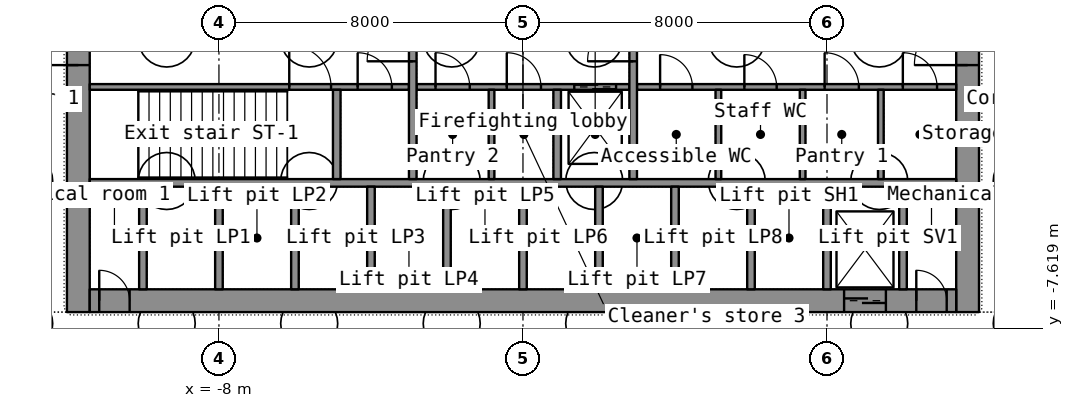
"""IFC4 building model, lengths in metres.
Left out: names, types, materials, properties, quantities, classifications, styles, units other than length and angle.
Written with IfcOpenShell. Run it as: python <this file> out.ifc"""

import sys

from ifc_helpers import new_model, si_unit, direction, frame, frame_2d, origin, place, context, subcontext, project, spatial, rectangle, extrude, element, fill, save


model = new_model("IFC4")
c1 = context("Model", 3, precision=1e-05, world=origin(), true_north=direction((0.0, 1.0)))
c2 = subcontext(c1, "Body", "Model", "MODEL_VIEW")
j1 = project(units=[si_unit("LENGTHUNIT", "METRE"), si_unit("PLANEANGLEUNIT", "RADIAN")], contexts=[c1])
p1 = place(None, origin())
s1 = spatial("IfcSite", under=j1, at=p1, CompositionType="ELEMENT")
p2 = place(p1, origin())
s2 = spatial("IfcBuilding", under=s1, at=p2, CompositionType="ELEMENT")
p3 = place(p2, frame((0.0, 0.0, -5.0)))
s3 = spatial("IfcBuildingStorey", under=s2, at=p3, CompositionType="ELEMENT", Elevation=-5.0)
p4 = place(p3, frame((-11.7, -7.2, 0.0), z_axis=(0.0, 0.0, 1.0), x_axis=(0.0, 1.0, 0.0)))
e1 = element("IfcWall", 1, at=p4, inside=s3, PredefinedType="SHEAR", context=c2, shape_type="SweptSolid", body=[
    extrude(rectangle(XDim=14.4, YDim=0.6, at=frame_2d((7.2, 0.0))), origin(), (0.0, 0.0, 1.0), 4.6),
])
p5 = place(p4, frame((6.5, 0.0, 0.0)))
e2 = element("IfcOpeningElement", 2, at=p5, cuts=e1, PredefinedType="OPENING", context=c2, shape_type="SweptSolid", body=[
    extrude(rectangle(XDim=1.4, YDim=2.2, at=frame_2d((0.7, 1.1))), frame((0.0, 0.31, 0.0), z_axis=(0.0, -1.0, 0.0), x_axis=(1.0, 0.0, 0.0)), (0.0, 0.0, 1.0), 0.62),
])
p6 = place(p3, frame((11.7, -7.2, 0.0), z_axis=(0.0, 0.0, 1.0), x_axis=(0.0, 1.0, 0.0)))
e3 = element("IfcWall", 3, at=p6, inside=s3, PredefinedType="SHEAR", context=c2, shape_type="SweptSolid", body=[
    extrude(rectangle(XDim=14.4, YDim=0.6, at=frame_2d((7.2, 0.0))), origin(), (0.0, 0.0, 1.0), 4.6),
])
p7 = place(p6, frame((6.5, 0.0, 0.0)))
e4 = element("IfcOpeningElement", 4, at=p7, cuts=e3, PredefinedType="OPENING", context=c2, shape_type="SweptSolid", body=[
    extrude(rectangle(XDim=1.4, YDim=2.2, at=frame_2d((0.7, 1.1))), frame((0.0, 0.31, 0.0), z_axis=(0.0, -1.0, 0.0), x_axis=(1.0, 0.0, 0.0)), (0.0, 0.0, 1.0), 0.62),
])
p8 = place(p3, frame((-11.4, -6.9, 0.0), z_axis=(0.0, 0.0, 1.0), x_axis=(1.0, 0.0, 0.0)))
e5 = element("IfcWall", 5, at=p8, inside=s3, PredefinedType="SHEAR", context=c2, shape_type="SweptSolid", body=[
    extrude(rectangle(XDim=22.8, YDim=0.6, at=frame_2d((11.4, 0.0))), origin(), (0.0, 0.0, 1.0), 4.6),
])
p9 = place(p8, frame((19.85, 0.0, 0.0)))
e6 = element("IfcOpeningElement", 6, at=p9, cuts=e5, PredefinedType="OPENING", context=c2, shape_type="SweptSolid", body=[
    extrude(rectangle(XDim=1.1, YDim=2.2, at=frame_2d((0.55, 1.1))), frame((0.0, 0.31, 0.0), z_axis=(0.0, -1.0, 0.0), x_axis=(1.0, 0.0, 0.0)), (0.0, 0.0, 1.0), 0.62),
])
p10 = place(p8, frame((0.25, 0.0, 0.0)))
e7 = element("IfcOpeningElement", 7, at=p10, cuts=e5, PredefinedType="OPENING", context=c2, shape_type="SweptSolid", body=[
    extrude(rectangle(XDim=0.8, YDim=2.05, at=frame_2d((0.4, 1.025))), frame((0.0, 0.31, 0.0), z_axis=(0.0, -1.0, 0.0), x_axis=(1.0, 0.0, 0.0)), (0.0, 0.0, 1.0), 0.62),
])
p11 = place(p8, frame((21.75, 0.0, 0.0)))
e8 = element("IfcOpeningElement", 8, at=p11, cuts=e5, PredefinedType="OPENING", context=c2, shape_type="SweptSolid", body=[
    extrude(rectangle(XDim=0.8, YDim=2.05, at=frame_2d((0.4, 1.025))), frame((0.0, 0.31, 0.0), z_axis=(0.0, -1.0, 0.0), x_axis=(1.0, 0.0, 0.0)), (0.0, 0.0, 1.0), 0.62),
])
p12 = place(p3, frame((-11.4, -3.8, 0.0), z_axis=(0.0, 0.0, 1.0), x_axis=(1.0, 0.0, 0.0)))
e9 = element("IfcWall", 9, at=p12, inside=s3, PredefinedType="SHEAR", context=c2, shape_type="SweptSolid", body=[
    extrude(rectangle(XDim=22.8, YDim=0.2, at=frame_2d((11.4, 0.0))), origin(), (0.0, 0.0, 1.0), 4.6),
])
for number, where, z_axis, x_axis in (
    (10, (-10.0, -6.6, 0.0), (0.0, 0.0, 1.0), (0.0, 1.0, 0.0)),
    (11, (-8.0, -6.6, 0.0), (0.0, 0.0, 1.0), (0.0, 1.0, 0.0)),
    (12, (-6.0, -6.6, 0.0), (0.0, 0.0, 1.0), (0.0, 1.0, 0.0)),
    (13, (-4.0, -6.6, 0.0), (0.0, 0.0, 1.0), (0.0, 1.0, 0.0)),
    (14, (-2.0, -6.6, 0.0), (0.0, 0.0, 1.0), (0.0, 1.0, 0.0)),
    (15, (0.0, -6.6, 0.0), (0.0, 0.0, 1.0), (0.0, 1.0, 0.0)),
    (16, (2.0, -6.6, 0.0), (0.0, 0.0, 1.0), (0.0, 1.0, 0.0)),
    (17, (4.0, -6.6, 0.0), (0.0, 0.0, 1.0), (0.0, 1.0, 0.0)),
    (18, (6.0, -6.6, 0.0), (0.0, 0.0, 1.0), (0.0, 1.0, 0.0)),
    (19, (8.0, -6.6, 0.0), (0.0, 0.0, 1.0), (0.0, 1.0, 0.0)),
    (20, (10.0, -6.6, 0.0), (0.0, 0.0, 1.0), (0.0, 1.0, 0.0)),
):
    element("IfcWall", number, at=place(p3, frame(where, z_axis=z_axis, x_axis=x_axis)), inside=s3, PredefinedType="SHEAR", context=c2, shape_type="SweptSolid", body=[
        extrude(rectangle(XDim=2.7, YDim=0.2, at=frame_2d((1.35, 0.0))), origin(), (0.0, 0.0, 1.0), 4.6),
    ])
p13 = place(p3, frame((-11.4, -1.275, 0.0), z_axis=(0.0, 0.0, 1.0), x_axis=(1.0, 0.0, 0.0)))
e21 = element("IfcWall", 21, at=p13, inside=s3, PredefinedType="SHEAR", context=c2, shape_type="SweptSolid", body=[
    extrude(rectangle(XDim=8.4, YDim=0.15, at=frame_2d((4.2, 0.0))), origin(), (0.0, 0.0, 1.0), 4.6),
])
p14 = place(p13, frame((5.25, 0.0, 0.0)))
e22 = element("IfcOpeningElement", 22, at=p14, cuts=e21, PredefinedType="OPENING", context=c2, shape_type="SweptSolid", body=[
    extrude(rectangle(XDim=1.1, YDim=2.15, at=frame_2d((0.55, 1.075))), frame((0.0, 0.085, 0.0), z_axis=(0.0, -1.0, 0.0), x_axis=(1.0, 0.0, 0.0)), (0.0, 0.0, 1.0), 0.17),
])
p15 = place(p13, frame((7.05, 0.0, 0.0)))
e23 = element("IfcOpeningElement", 23, at=p15, cuts=e21, PredefinedType="OPENING", context=c2, shape_type="SweptSolid", body=[
    extrude(rectangle(XDim=0.9, YDim=2.1, at=frame_2d((0.45, 1.05))), frame((0.0, 0.085, 0.0), z_axis=(0.0, -1.0, 0.0), x_axis=(1.0, 0.0, 0.0)), (0.0, 0.0, 1.0), 0.17),
])
p16 = place(p3, frame((-2.8, -1.275, 0.0), z_axis=(0.0, 0.0, 1.0), x_axis=(1.0, 0.0, 0.0)))
e24 = element("IfcWall", 24, at=p16, inside=s3, PredefinedType="SHEAR", context=c2, shape_type="SweptSolid", body=[
    extrude(rectangle(XDim=5.6, YDim=0.15, at=frame_2d((2.8, 0.0))), origin(), (0.0, 0.0, 1.0), 4.6),
])
p17 = place(p16, frame((4.15, 0.0, 0.0)))
e25 = element("IfcOpeningElement", 25, at=p17, cuts=e24, PredefinedType="OPENING", context=c2, shape_type="SweptSolid", body=[
    extrude(rectangle(XDim=1.1, YDim=2.2, at=frame_2d((0.55, 1.1))), frame((0.0, 0.085, 0.0), z_axis=(0.0, -1.0, 0.0), x_axis=(1.0, 0.0, 0.0)), (0.0, 0.0, 1.0), 0.17),
])
p18 = place(p16, frame((0.499, 0.0, 0.0)))
e26 = element("IfcOpeningElement", 26, at=p18, cuts=e24, PredefinedType="OPENING", context=c2, shape_type="SweptSolid", body=[
    extrude(rectangle(XDim=0.9, YDim=2.1, at=frame_2d((0.45, 1.05))), frame((0.0, 0.085, 0.0), z_axis=(0.0, -1.0, 0.0), x_axis=(1.0, 0.0, 0.0)), (0.0, 0.0, 1.0), 0.17),
])
p19 = place(p16, frame((2.374, 0.0, 0.0)))
e27 = element("IfcOpeningElement", 27, at=p19, cuts=e24, PredefinedType="OPENING", context=c2, shape_type="SweptSolid", body=[
    extrude(rectangle(XDim=0.9, YDim=2.1, at=frame_2d((0.45, 1.05))), frame((0.0, 0.085, 0.0), z_axis=(0.0, -1.0, 0.0), x_axis=(1.0, 0.0, 0.0)), (0.0, 0.0, 1.0), 0.17),
])
p20 = place(p3, frame((3.0, -1.275, 0.0), z_axis=(0.0, 0.0, 1.0), x_axis=(1.0, 0.0, 0.0)))
e28 = element("IfcWall", 28, at=p20, inside=s3, PredefinedType="PARTITIONING", context=c2, shape_type="SweptSolid", body=[
    extrude(rectangle(XDim=8.4, YDim=0.15, at=frame_2d((4.2, 0.0))), origin(), (0.0, 0.0, 1.0), 4.6),
])
p21 = place(p20, frame((0.608, 0.0, 0.0)))
e29 = element("IfcOpeningElement", 29, at=p21, cuts=e28, PredefinedType="OPENING", context=c2, shape_type="SweptSolid", body=[
    extrude(rectangle(XDim=0.85, YDim=2.1, at=frame_2d((0.425, 1.05))), frame((0.0, 0.085, 0.0), z_axis=(0.0, -1.0, 0.0), x_axis=(1.0, 0.0, 0.0)), (0.0, 0.0, 1.0), 0.17),
])
p22 = place(p20, frame((2.825, 0.0, 0.0)))
e30 = element("IfcOpeningElement", 30, at=p22, cuts=e28, PredefinedType="OPENING", context=c2, shape_type="SweptSolid", body=[
    extrude(rectangle(XDim=0.85, YDim=2.1, at=frame_2d((0.425, 1.05))), frame((0.0, 0.085, 0.0), z_axis=(0.0, -1.0, 0.0), x_axis=(1.0, 0.0, 0.0)), (0.0, 0.0, 1.0), 0.17),
])
p23 = place(p20, frame((4.938, 0.0, 0.0)))
e31 = element("IfcOpeningElement", 31, at=p23, cuts=e28, PredefinedType="OPENING", context=c2, shape_type="SweptSolid", body=[
    extrude(rectangle(XDim=0.9, YDim=2.1, at=frame_2d((0.45, 1.05))), frame((0.0, 0.085, 0.0), z_axis=(0.0, -1.0, 0.0), x_axis=(1.0, 0.0, 0.0)), (0.0, 0.0, 1.0), 0.17),
])
p24 = place(p20, frame((6.996, 0.0, 0.0)))
e32 = element("IfcOpeningElement", 32, at=p24, cuts=e28, PredefinedType="OPENING", context=c2, shape_type="SweptSolid", body=[
    extrude(rectangle(XDim=0.9, YDim=2.1, at=frame_2d((0.45, 1.05))), frame((0.0, 0.085, 0.0), z_axis=(0.0, -1.0, 0.0), x_axis=(1.0, 0.0, 0.0)), (0.0, 0.0, 1.0), 0.17),
])
p25 = place(p3, frame((-2.9, -3.7, 0.0), z_axis=(0.0, 0.0, 1.0), x_axis=(0.0, 1.0, 0.0)))
e33 = element("IfcWall", 33, at=p25, inside=s3, PredefinedType="SHEAR", context=c2, shape_type="SweptSolid", body=[
    extrude(rectangle(XDim=7.4, YDim=0.2, at=frame_2d((3.7, 0.0))), origin(), (0.0, 0.0, 1.0), 4.6),
])
p26 = place(p25, frame((3.1, 0.0, 0.0)))
e34 = element("IfcOpeningElement", 34, at=p26, cuts=e33, PredefinedType="OPENING", context=c2, shape_type="SweptSolid", body=[
    extrude(rectangle(XDim=1.2, YDim=2.2, at=frame_2d((0.6, 1.1))), frame((0.0, 0.11, 0.0), z_axis=(0.0, -1.0, 0.0), x_axis=(1.0, 0.0, 0.0)), (0.0, 0.0, 1.0), 0.22),
])
p27 = place(p3, frame((2.9, -3.7, 0.0), z_axis=(0.0, 0.0, 1.0), x_axis=(0.0, 1.0, 0.0)))
e35 = element("IfcWall", 35, at=p27, inside=s3, PredefinedType="SHEAR", context=c2, shape_type="SweptSolid", body=[
    extrude(rectangle(XDim=7.4, YDim=0.2, at=frame_2d((3.7, 0.0))), origin(), (0.0, 0.0, 1.0), 4.6),
])
p28 = place(p27, frame((3.1, 0.0, 0.0)))
e36 = element("IfcOpeningElement", 36, at=p28, cuts=e35, PredefinedType="OPENING", context=c2, shape_type="SweptSolid", body=[
    extrude(rectangle(XDim=1.2, YDim=2.2, at=frame_2d((0.6, 1.1))), frame((0.0, 0.11, 0.0), z_axis=(0.0, -1.0, 0.0), x_axis=(1.0, 0.0, 0.0)), (0.0, 0.0, 1.0), 0.22),
])
for number, where, z_axis, x_axis in (
    (37, (0.9, -3.7, 0.0), (0.0, 0.0, 1.0), (0.0, 1.0, 0.0)),
    (38, (-4.9, -3.7, 0.0), (0.0, 0.0, 1.0), (0.0, 1.0, 0.0)),
):
    element("IfcWall", number, at=place(p3, frame(where, z_axis=z_axis, x_axis=x_axis)), inside=s3, PredefinedType="SHEAR", context=c2, shape_type="SweptSolid", body=[
        extrude(rectangle(XDim=2.35, YDim=0.2, at=frame_2d((1.175, 0.0))), origin(), (0.0, 0.0, 1.0), 4.6),
    ])
for number, where, z_axis, x_axis in (
    (39, (5.142, -3.7, 0.0), (0.0, 0.0, 1.0), (0.0, 1.0, 0.0)),
    (40, (7.359, -3.7, 0.0), (0.0, 0.0, 1.0), (0.0, 1.0, 0.0)),
    (41, (9.417, -3.7, 0.0), (0.0, 0.0, 1.0), (0.0, 1.0, 0.0)),
    (42, (-0.827, -3.7, 0.0), (0.0, 0.0, 1.0), (0.0, 1.0, 0.0)),
):
    element("IfcWall", number, at=place(p3, frame(where, z_axis=z_axis, x_axis=x_axis)), inside=s3, PredefinedType="PARTITIONING", context=c2, shape_type="SweptSolid", body=[
        extrude(rectangle(XDim=2.35, YDim=0.15, at=frame_2d((1.175, 0.0))), origin(), (0.0, 0.0, 1.0), 4.6),
    ])
p29 = place(p9, origin())
e43 = element("IfcDoor", 43, at=p29, inside=s3, OperationType="DOUBLE_DOOR_SLIDING", PredefinedType="DOOR", context=c2, shape_type="SweptSolid", body=[
    extrude(rectangle(XDim=1.1, YDim=2.2, at=frame_2d((0.55, 1.1))), frame((0.0, 0.025, 0.0), z_axis=(0.0, -1.0, 0.0), x_axis=(1.0, 0.0, 0.0)), (0.0, 0.0, 1.0), 0.05),
])
fill(e6, e43)
p30 = place(p10, origin())
e44 = element("IfcDoor", 44, at=p30, inside=s3, OperationType="SINGLE_SWING_LEFT", PredefinedType="DOOR", context=c2, shape_type="SweptSolid", body=[
    extrude(rectangle(XDim=0.8, YDim=2.05, at=frame_2d((0.4, 1.025))), frame((0.0, 0.025, 0.0), z_axis=(0.0, -1.0, 0.0), x_axis=(1.0, 0.0, 0.0)), (0.0, 0.0, 1.0), 0.05),
])
fill(e7, e44)
p31 = place(p11, origin())
e45 = element("IfcDoor", 45, at=p31, inside=s3, OperationType="SINGLE_SWING_LEFT", PredefinedType="DOOR", context=c2, shape_type="SweptSolid", body=[
    extrude(rectangle(XDim=0.8, YDim=2.05, at=frame_2d((0.4, 1.025))), frame((0.0, 0.025, 0.0), z_axis=(0.0, -1.0, 0.0), x_axis=(1.0, 0.0, 0.0)), (0.0, 0.0, 1.0), 0.05),
])
fill(e8, e45)
p32 = place(p5, origin())
e46 = element("IfcDoor", 46, at=p32, inside=s3, OperationType="DOUBLE_DOOR_SINGLE_SWING", PredefinedType="DOOR", context=c2, shape_type="SweptSolid", body=[
    extrude(rectangle(XDim=1.4, YDim=2.2, at=frame_2d((0.7, 1.1))), frame((0.0, 0.025, 0.0), z_axis=(0.0, -1.0, 0.0), x_axis=(1.0, 0.0, 0.0)), (0.0, 0.0, 1.0), 0.05),
])
fill(e2, e46)
p33 = place(p7, origin())
e47 = element("IfcDoor", 47, at=p33, inside=s3, OperationType="DOUBLE_DOOR_SINGLE_SWING", PredefinedType="DOOR", context=c2, shape_type="SweptSolid", body=[
    extrude(rectangle(XDim=1.4, YDim=2.2, at=frame_2d((0.7, 1.1))), frame((0.0, 0.025, 0.0), z_axis=(0.0, -1.0, 0.0), x_axis=(1.0, 0.0, 0.0)), (0.0, 0.0, 1.0), 0.05),
])
fill(e4, e47)
p34 = place(p26, origin())
e48 = element("IfcDoor", 48, at=p34, inside=s3, OperationType="SINGLE_SWING_LEFT", PredefinedType="DOOR", context=c2, shape_type="SweptSolid", body=[
    extrude(rectangle(XDim=1.2, YDim=2.2, at=frame_2d((0.6, 1.1))), frame((0.0, 0.025, 0.0), z_axis=(0.0, -1.0, 0.0), x_axis=(1.0, 0.0, 0.0)), (0.0, 0.0, 1.0), 0.05),
])
fill(e34, e48)
p35 = place(p28, origin())
e49 = element("IfcDoor", 49, at=p35, inside=s3, OperationType="SINGLE_SWING_LEFT", PredefinedType="DOOR", context=c2, shape_type="SweptSolid", body=[
    extrude(rectangle(XDim=1.2, YDim=2.2, at=frame_2d((0.6, 1.1))), frame((0.0, 0.025, 0.0), z_axis=(0.0, -1.0, 0.0), x_axis=(1.0, 0.0, 0.0)), (0.0, 0.0, 1.0), 0.05),
])
fill(e36, e49)
p36 = place(p17, origin())
e50 = element("IfcDoor", 50, at=p36, inside=s3, OperationType="DOUBLE_DOOR_SLIDING", PredefinedType="DOOR", context=c2, shape_type="SweptSolid", body=[
    extrude(rectangle(XDim=1.1, YDim=2.2, at=frame_2d((0.55, 1.1))), frame((0.0, 0.025, 0.0), z_axis=(0.0, -1.0, 0.0), x_axis=(1.0, 0.0, 0.0)), (0.0, 0.0, 1.0), 0.05),
])
fill(e25, e50)
p37 = place(p14, origin())
e51 = element("IfcDoor", 51, at=p37, inside=s3, OperationType="SINGLE_SWING_LEFT", PredefinedType="DOOR", context=c2, shape_type="SweptSolid", body=[
    extrude(rectangle(XDim=1.1, YDim=2.15, at=frame_2d((0.55, 1.075))), frame((0.0, 0.025, 0.0), z_axis=(0.0, -1.0, 0.0), x_axis=(1.0, 0.0, 0.0)), (0.0, 0.0, 1.0), 0.05),
])
fill(e22, e51)
p38 = place(p21, origin())
e52 = element("IfcDoor", 52, at=p38, inside=s3, OperationType="SINGLE_SWING_LEFT", PredefinedType="DOOR", context=c2, shape_type="SweptSolid", body=[
    extrude(rectangle(XDim=0.85, YDim=2.1, at=frame_2d((0.425, 1.05))), frame((0.0, 0.025, 0.0), z_axis=(0.0, -1.0, 0.0), x_axis=(1.0, 0.0, 0.0)), (0.0, 0.0, 1.0), 0.05),
])
fill(e29, e52)
p39 = place(p22, origin())
e53 = element("IfcDoor", 53, at=p39, inside=s3, OperationType="SINGLE_SWING_LEFT", PredefinedType="DOOR", context=c2, shape_type="SweptSolid", body=[
    extrude(rectangle(XDim=0.85, YDim=2.1, at=frame_2d((0.425, 1.05))), frame((0.0, 0.025, 0.0), z_axis=(0.0, -1.0, 0.0), x_axis=(1.0, 0.0, 0.0)), (0.0, 0.0, 1.0), 0.05),
])
fill(e30, e53)
p40 = place(p23, origin())
e54 = element("IfcDoor", 54, at=p40, inside=s3, OperationType="SINGLE_SWING_LEFT", PredefinedType="DOOR", context=c2, shape_type="SweptSolid", body=[
    extrude(rectangle(XDim=0.9, YDim=2.1, at=frame_2d((0.45, 1.05))), frame((0.0, 0.025, 0.0), z_axis=(0.0, -1.0, 0.0), x_axis=(1.0, 0.0, 0.0)), (0.0, 0.0, 1.0), 0.05),
])
fill(e31, e54)
p41 = place(p24, origin())
e55 = element("IfcDoor", 55, at=p41, inside=s3, OperationType="SINGLE_SWING_LEFT", PredefinedType="DOOR", context=c2, shape_type="SweptSolid", body=[
    extrude(rectangle(XDim=0.9, YDim=2.1, at=frame_2d((0.45, 1.05))), frame((0.0, 0.025, 0.0), z_axis=(0.0, -1.0, 0.0), x_axis=(1.0, 0.0, 0.0)), (0.0, 0.0, 1.0), 0.05),
])
fill(e32, e55)
p42 = place(p18, origin())
e56 = element("IfcDoor", 56, at=p42, inside=s3, OperationType="SINGLE_SWING_LEFT", PredefinedType="DOOR", context=c2, shape_type="SweptSolid", body=[
    extrude(rectangle(XDim=0.9, YDim=2.1, at=frame_2d((0.45, 1.05))), frame((0.0, 0.025, 0.0), z_axis=(0.0, -1.0, 0.0), x_axis=(1.0, 0.0, 0.0)), (0.0, 0.0, 1.0), 0.05),
])
fill(e26, e56)
p43 = place(p19, origin())
e57 = element("IfcDoor", 57, at=p43, inside=s3, OperationType="SINGLE_SWING_LEFT", PredefinedType="DOOR", context=c2, shape_type="SweptSolid", body=[
    extrude(rectangle(XDim=0.9, YDim=2.1, at=frame_2d((0.45, 1.05))), frame((0.0, 0.025, 0.0), z_axis=(0.0, -1.0, 0.0), x_axis=(1.0, 0.0, 0.0)), (0.0, 0.0, 1.0), 0.05),
])
fill(e27, e57)
p44 = place(p15, origin())
e58 = element("IfcDoor", 58, at=p44, inside=s3, OperationType="SINGLE_SWING_LEFT", PredefinedType="DOOR", context=c2, shape_type="SweptSolid", body=[
    extrude(rectangle(XDim=0.9, YDim=2.1, at=frame_2d((0.45, 1.05))), frame((0.0, 0.025, 0.0), z_axis=(0.0, -1.0, 0.0), x_axis=(1.0, 0.0, 0.0)), (0.0, 0.0, 1.0), 0.05),
])
fill(e23, e58)
save(model, sys.argv[1])
